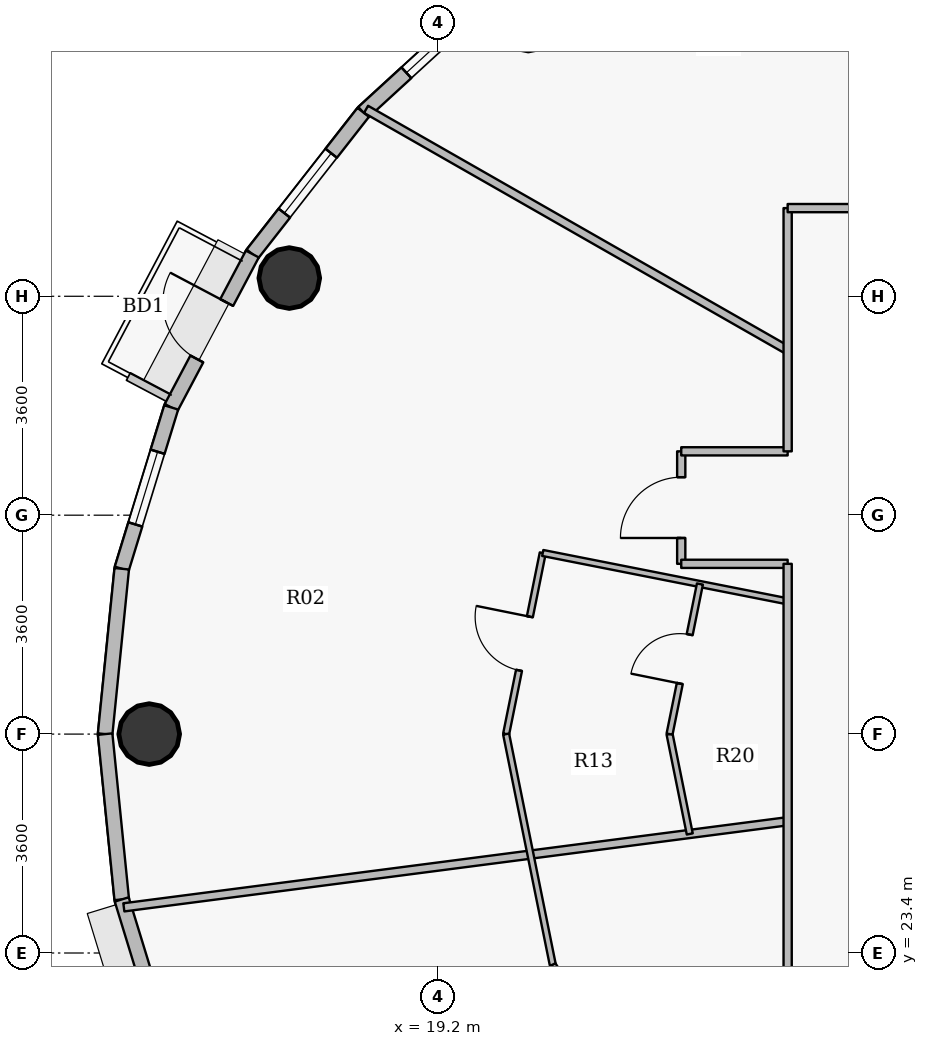
"""IFC4 building model, lengths in metres.
Left out: names, types, materials, properties, quantities, classifications, styles, units other than length and angle.
Written with IfcOpenShell. Run it as: python <this file> out.ifc"""

import sys

from ifc_helpers import new_model, si_unit, direction, frame, frame_2d, origin, origin_2d, place, context, subcontext, project, spatial, rectangle, hollow_circle, extrude, source, transform, mapped, element, fill, save


model = new_model("IFC4")
c1 = context("Model", 3, precision=1e-05, world=origin(), true_north=direction((0.0, 1.0)))
c2 = subcontext(c1, "Body", "Model", "MODEL_VIEW")
j1 = project(units=[si_unit("LENGTHUNIT", "METRE"), si_unit("PLANEANGLEUNIT", "RADIAN")], contexts=[c1])
p1 = place(None, origin())
s1 = spatial("IfcSite", under=j1, at=p1, CompositionType="ELEMENT")
p2 = place(p1, origin())
s2 = spatial("IfcBuilding", under=s1, at=p2, CompositionType="ELEMENT")
p3 = place(p2, frame((0.0, 0.0, 295.5)))
s3 = spatial("IfcBuildingStorey", under=s2, at=p3, CompositionType="ELEMENT", Elevation=295.5)
for number, where, z_axis, x_axis in (
    (1, (16.754, 34.5, 0.0), (0.0, 0.0, 1.0), (1.0, 0.0, 0.0)),
    (2, (14.45, 27.0, 0.0), (0.0, 0.0, 1.0), (1.0, 0.0, 0.0)),
):
    element("IfcColumn", number, at=place(p3, frame(where, z_axis=z_axis, x_axis=x_axis)), inside=s3, PredefinedType="COLUMN", context=c2, shape_type="SweptSolid", body=[
        extrude(hollow_circle(Radius=0.5, WallThickness=0.032, at=origin_2d()), origin(), (0.0, 0.0, 1.0), 3.75),
    ])
p4 = place(p3, frame((17.97, 37.225, 0.0), z_axis=(0.0, 0.0, 1.0), x_axis=(0.737068506972, 0.675818034703, 0.0)))
e3 = element("IfcWall", 3, at=p4, inside=s3, PredefinedType="SOLIDWALL", context=c2, shape_type="SweptSolid", body=[
    extrude(rectangle(XDim=3.077, YDim=0.24, at=frame_2d((1.539, 0.0))), origin(), (0.0, 0.0, 1.0), 3.5),
])
p5 = place(p4, frame((0.963, 0.0, 0.9)))
e4 = element("IfcOpeningElement", 4, at=p5, cuts=e3, PredefinedType="OPENING", context=c2, shape_type="SweptSolid", body=[
    extrude(rectangle(XDim=1.25, YDim=1.65, at=origin_2d()), frame((0.625, 0.13, 0.825), z_axis=(0.0, -1.0, 0.0), x_axis=(1.0, 0.0, 0.0)), (0.0, 0.0, 1.0), 0.26),
])
p6 = place(p3, frame((16.146, 34.895, 0.0), z_axis=(0.0, 0.0, 1.0), x_axis=(0.616337186556, 0.787482363275, 0.0)))
e5 = element("IfcWall", 5, at=p6, inside=s3, PredefinedType="SOLIDWALL", context=c2, shape_type="SweptSolid", body=[
    extrude(rectangle(XDim=2.958, YDim=0.24, at=frame_2d((1.479, 0.0))), origin(), (0.0, 0.0, 1.0), 3.5),
])
p7 = place(p6, frame((0.854, 0.0, 0.9)))
e6 = element("IfcOpeningElement", 6, at=p7, cuts=e5, PredefinedType="OPENING", context=c2, shape_type="SweptSolid", body=[
    extrude(rectangle(XDim=1.25, YDim=1.65, at=origin_2d()), frame((0.625, 0.13, 0.825), z_axis=(0.0, -1.0, 0.0), x_axis=(1.0, 0.0, 0.0)), (0.0, 0.0, 1.0), 0.26),
])
p8 = place(p3, frame((14.812, 32.372, 0.0), z_axis=(0.0, 0.0, 1.0), x_axis=(0.467628269026, 0.883925224218, 0.0)))
e7 = element("IfcWall", 7, at=p8, inside=s3, PredefinedType="SOLIDWALL", context=c2, shape_type="SweptSolid", body=[
    extrude(rectangle(XDim=2.854, YDim=0.24, at=frame_2d((1.427, 0.0))), origin(), (0.0, 0.0, 1.0), 3.5),
])
p9 = place(p8, frame((0.902, 0.0, 0.0)))
e8 = element("IfcOpeningElement", 8, at=p9, cuts=e7, PredefinedType="OPENING", context=c2, shape_type="SweptSolid", body=[
    extrude(rectangle(XDim=1.05, YDim=2.15, at=origin_2d()), frame((0.525, 0.13, 1.075), z_axis=(0.0, -1.0, 0.0), x_axis=(1.0, 0.0, 0.0)), (0.0, 0.0, 1.0), 0.26),
])
p10 = place(p3, frame((13.998, 29.719, 0.0), z_axis=(0.0, 0.0, 1.0), x_axis=(0.2931213403, 0.956075248012, 0.0)))
e9 = element("IfcWall", 9, at=p10, inside=s3, PredefinedType="SOLIDWALL", context=c2, shape_type="SweptSolid", body=[
    extrude(rectangle(XDim=2.775, YDim=0.24, at=frame_2d((1.388, 0.0))), origin(), (0.0, 0.0, 1.0), 3.5),
])
p11 = place(p10, frame((0.763, 0.0, 0.9)))
e10 = element("IfcOpeningElement", 10, at=p11, cuts=e9, PredefinedType="OPENING", context=c2, shape_type="SweptSolid", body=[
    extrude(rectangle(XDim=1.25, YDim=1.65, at=origin_2d()), frame((0.625, 0.13, 0.825), z_axis=(0.0, -1.0, 0.0), x_axis=(1.0, 0.0, 0.0)), (0.0, 0.0, 1.0), 0.26),
])
for number, where, z_axis, x_axis in (
    (11, (13.725, 27.0, 0.0), (0.0, 0.0, 1.0), (0.1, 0.995, 0.0)),
    (12, (13.998, 24.281, 0.0), (0.0, 0.0, 1.0), (-0.1, 0.995, 0.0)),
):
    element("IfcWall", number, at=place(p3, frame(where, z_axis=z_axis, x_axis=x_axis)), inside=s3, PredefinedType="SOLIDWALL", context=c2, shape_type="SweptSolid", body=[
        extrude(rectangle(XDim=2.733, YDim=0.24, at=frame_2d((1.366, 0.0))), origin(), (0.0, 0.0, 1.0), 3.5),
    ])
p12 = place(p3, frame((14.812, 21.628, 0.0), z_axis=(0.0, 0.0, 1.0), x_axis=(-0.2931213403, 0.956075248012, 0.0)))
e13 = element("IfcWall", 13, at=p12, inside=s3, PredefinedType="SOLIDWALL", context=c2, shape_type="SweptSolid", body=[
    extrude(rectangle(XDim=2.775, YDim=0.24, at=frame_2d((1.388, 0.0))), origin(), (0.0, 0.0, 1.0), 3.5),
])
p13 = place(p3, frame((14.033, 24.151, 0.0), z_axis=(0.0, 0.0, 1.0), x_axis=(0.99169266035, 0.128629963101, 0.0)))
e14 = element("IfcWall", 14, at=p13, inside=s3, PredefinedType="PARTITIONING", context=c2, shape_type="SweptSolid", body=[
    extrude(rectangle(XDim=11.009, YDim=0.135, at=frame_2d((5.504, 0.0))), origin(), (0.0, 0.0, 1.0), 2.985),
])
p14 = place(p3, frame((18.016, 37.274, 0.0), z_axis=(0.0, 0.0, 1.0), x_axis=(0.868277005727, -0.496079672357, 0.0)))
e15 = element("IfcWall", 15, at=p14, inside=s3, PredefinedType="PARTITIONING", context=c2, shape_type="SweptSolid", body=[
    extrude(rectangle(XDim=7.985, YDim=0.135, at=frame_2d((3.993, 0.0))), origin(), (0.0, 0.0, 1.0), 2.985),
])
p15 = place(p3, frame((20.32, 27.0, 0.0), z_axis=(0.0, 0.0, 1.0), x_axis=(0.198201469781, 0.980161301713, 0.0)))
e16 = element("IfcWall", 16, at=p15, inside=s3, PredefinedType="PARTITIONING", context=c2, shape_type="SweptSolid", body=[
    extrude(rectangle(XDim=3.039, YDim=0.1, at=frame_2d((1.52, 0.0))), origin(), (0.0, 0.0, 1.0), 3.035),
])
p16 = place(p15, frame((1.069, 0.0, 0.0)))
e17 = element("IfcOpeningElement", 17, at=p16, cuts=e16, PredefinedType="OPENING", context=c2, shape_type="SweptSolid", body=[
    extrude(rectangle(XDim=0.9, YDim=2.1, at=origin_2d()), frame((0.45, 0.06, 1.05), z_axis=(0.0, -1.0, 0.0), x_axis=(1.0, 0.0, 0.0)), (0.0, 0.0, 1.0), 0.12),
])
p17 = place(p3, frame((20.32, 27.0, 0.0), z_axis=(0.0, 0.0, 1.0), x_axis=(0.198226068862, -0.980156327135, 0.0)))
e18 = element("IfcWall", 18, at=p17, inside=s3, PredefinedType="PARTITIONING", context=c2, shape_type="SweptSolid", body=[
    extrude(rectangle(XDim=3.871, YDim=0.1, at=frame_2d((1.936, 0.0))), origin(), (0.0, 0.0, 1.0), 3.035),
])
p18 = place(p3, frame((20.922, 29.979, 0.0), z_axis=(0.0, 0.0, 1.0), x_axis=(0.981042206934, -0.19379419035, 0.0)))
e19 = element("IfcWall", 19, at=p18, inside=s3, PredefinedType="PARTITIONING", context=c2, shape_type="SweptSolid", body=[
    extrude(rectangle(XDim=4.106, YDim=0.1, at=frame_2d((2.053, 0.0))), origin(), (0.0, 0.0, 1.0), 3.5),
])
p19 = place(p3, frame((21.087, 23.206, 0.0), z_axis=(0.0, 0.0, 1.0), x_axis=(0.545435886628, -0.838152547916, 0.0)))
e20 = element("IfcWall", 20, at=p19, inside=s3, PredefinedType="PARTITIONING", context=c2, shape_type="SweptSolid", body=[
    extrude(rectangle(XDim=4.083, YDim=0.1, at=frame_2d((2.042, 0.0))), origin(), (0.0, 0.0, 1.0), 3.035),
])
p20 = place(p3, frame((23.008, 27.0, 0.0), z_axis=(0.0, 0.0, 1.0), x_axis=(0.198189512146, -0.980163719628, 0.0)))
e21 = element("IfcWall", 21, at=p20, inside=s3, PredefinedType="PARTITIONING", context=c2, shape_type="SweptSolid", body=[
    extrude(rectangle(XDim=1.675, YDim=0.1, at=frame_2d((0.838, 0.0))), origin(), (0.0, 0.0, 1.0), 3.035),
])
p21 = place(p3, frame((23.008, 27.0, 0.0), z_axis=(0.0, 0.0, 1.0), x_axis=(0.19818541272, 0.980164548525, 0.0)))
e22 = element("IfcWall", 22, at=p21, inside=s3, PredefinedType="PARTITIONING", context=c2, shape_type="SweptSolid", body=[
    extrude(rectangle(XDim=2.518, YDim=0.1, at=frame_2d((1.259, 0.0))), origin(), (0.0, 0.0, 1.0), 3.035),
])
p22 = place(p21, frame((0.849, 0.0, 0.0)))
e23 = element("IfcOpeningElement", 23, at=p22, cuts=e22, PredefinedType="OPENING", context=c2, shape_type="SweptSolid", body=[
    extrude(rectangle(XDim=0.82, YDim=2.1, at=origin_2d()), frame((0.41, 0.06, 1.05), z_axis=(0.0, -1.0, 0.0), x_axis=(1.0, 0.0, 0.0)), (0.0, 0.0, 1.0), 0.12),
])
p23 = place(p3, frame((23.2, 29.8, 0.0), z_axis=(0.0, 0.0, 1.0), x_axis=(0.0, 1.0, 0.0)))
e24 = element("IfcWall", 24, at=p23, inside=s3, PredefinedType="PARTITIONING", context=c2, shape_type="SweptSolid", body=[
    extrude(rectangle(XDim=1.85, YDim=0.135, at=frame_2d((0.925, 0.0))), origin(), (0.0, 0.0, 1.0), 3.5),
])
p24 = place(p23, frame((0.425, 0.0, 0.0)))
e25 = element("IfcOpeningElement", 25, at=p24, cuts=e24, PredefinedType="OPENING", context=c2, shape_type="SweptSolid", body=[
    extrude(rectangle(XDim=1.0, YDim=2.15, at=origin_2d()), frame((0.5, 0.078, 1.075), z_axis=(0.0, -1.0, 0.0), x_axis=(1.0, 0.0, 0.0)), (0.0, 0.0, 1.0), 0.155),
])
p25 = place(p3, frame((23.2, 29.8, 0.0), z_axis=(0.0, 0.0, 1.0), x_axis=(1.0, 0.0, 0.0)))
e26 = element("IfcWall", 26, at=p25, inside=s3, PredefinedType="PARTITIONING", context=c2, shape_type="SweptSolid", body=[
    extrude(rectangle(XDim=1.75, YDim=0.135, at=frame_2d((0.875, 0.0))), origin(), (0.0, 0.0, 1.0), 3.5),
])
p26 = place(p3, frame((23.2, 31.65, 0.0), z_axis=(0.0, 0.0, 1.0), x_axis=(1.0, 0.0, 0.0)))
e27 = element("IfcWall", 27, at=p26, inside=s3, PredefinedType="PARTITIONING", context=c2, shape_type="SweptSolid", body=[
    extrude(rectangle(XDim=1.75, YDim=0.135, at=frame_2d((0.875, 0.0))), origin(), (0.0, 0.0, 1.0), 3.035),
])
p27 = place(p3, frame((24.95, 18.35, 0.0), z_axis=(0.0, 0.0, 1.0), x_axis=(0.0, 1.0, 0.0)))
e28 = element("IfcWall", 28, at=p27, inside=s3, PredefinedType="PARTITIONING", context=c2, shape_type="SweptSolid", body=[
    extrude(rectangle(XDim=11.45, YDim=0.135, at=frame_2d((5.725, 0.0))), origin(), (0.0, 0.0, 1.0), 3.035),
])
p28 = place(p27, frame((3.128, 0.0, 0.0)))
e29 = element("IfcOpeningElement", 29, at=p28, cuts=e28, PredefinedType="OPENING", context=c2, shape_type="SweptSolid", body=[
    extrude(rectangle(XDim=1.0, YDim=2.15, at=origin_2d()), frame((0.5, 0.078, 1.075), z_axis=(0.0, -1.0, 0.0), x_axis=(1.0, 0.0, 0.0)), (0.0, 0.0, 1.0), 0.155),
])
p29 = place(p3, frame((24.95, 31.65, 0.0), z_axis=(0.0, 0.0, 1.0), x_axis=(0.0, 1.0, 0.0)))
e30 = element("IfcWall", 30, at=p29, inside=s3, PredefinedType="PARTITIONING", context=c2, shape_type="SweptSolid", body=[
    extrude(rectangle(XDim=4.0, YDim=0.135, at=frame_2d((2.0, 0.0))), origin(), (0.0, 0.0, 1.0), 3.035),
])
p30 = place(p3, frame((24.95, 35.65, 0.0), z_axis=(0.0, 0.0, 1.0), x_axis=(1.0, 0.0, 0.0)))
e31 = element("IfcWall", 31, at=p30, inside=s3, PredefinedType="PARTITIONING", context=c2, shape_type="SweptSolid", body=[
    extrude(rectangle(XDim=10.1, YDim=0.135, at=frame_2d((5.05, 0.0))), origin(), (0.0, 0.0, 1.0), 3.035),
])
p31 = place(p30, frame((1.192, 0.0, 0.0)))
e32 = element("IfcOpeningElement", 32, at=p31, cuts=e31, PredefinedType="OPENING", context=c2, shape_type="SweptSolid", body=[
    extrude(rectangle(XDim=1.0, YDim=2.15, at=origin_2d()), frame((0.5, 0.078, 1.075), z_axis=(0.0, -1.0, 0.0), x_axis=(1.0, 0.0, 0.0)), (0.0, 0.0, 1.0), 0.155),
])
m1 = source(origin(), c2, "Body", "SweptSolid", [
    extrude(rectangle(XDim=1.25, YDim=1.65, at=origin_2d()), frame((0.625, 0.03, 0.825), z_axis=(0.0, -1.0, 0.0), x_axis=(1.0, 0.0, 0.0)), (0.0, 0.0, 1.0), 0.06),
])
p32 = place(p5, origin())
e33 = element("IfcWindow", 33, at=p32, inside=s3, PartitioningType="SINGLE_PANEL", PredefinedType="WINDOW", context=c2, shape_type="MappedRepresentation", body=[
    mapped(m1, transform((0.0, 0.0, 0.0), x_axis=(1.0, 0.0, 0.0), y_axis=(0.0, 1.0, 0.0), z_axis=(0.0, 0.0, 1.0), scale=1.0)),
])
fill(e4, e33)
p33 = place(p7, origin())
e34 = element("IfcWindow", 34, at=p33, inside=s3, PartitioningType="SINGLE_PANEL", PredefinedType="WINDOW", context=c2, shape_type="MappedRepresentation", body=[
    mapped(m1, transform((0.0, 0.0, 0.0), x_axis=(1.0, 0.0, 0.0), y_axis=(0.0, 1.0, 0.0), z_axis=(0.0, 0.0, 1.0), scale=1.0)),
])
fill(e6, e34)
m2 = source(origin(), c2, "Body", "SweptSolid", [
    extrude(rectangle(XDim=1.05, YDim=2.15, at=origin_2d()), frame((0.525, 0.025, 1.075), z_axis=(0.0, -1.0, 0.0), x_axis=(1.0, 0.0, 0.0)), (0.0, 0.0, 1.0), 0.05),
])
p34 = place(p9, origin())
e35 = element("IfcDoor", 35, at=p34, inside=s3, OperationType="SINGLE_SWING_RIGHT", PredefinedType="DOOR", context=c2, shape_type="MappedRepresentation", body=[
    mapped(m2, transform((0.0, 0.0, 0.0), x_axis=(1.0, 0.0, 0.0), y_axis=(0.0, 1.0, 0.0), z_axis=(0.0, 0.0, 1.0), scale=1.0)),
])
fill(e8, e35)
p35 = place(p11, origin())
e36 = element("IfcWindow", 36, at=p35, inside=s3, PartitioningType="SINGLE_PANEL", PredefinedType="WINDOW", context=c2, shape_type="MappedRepresentation", body=[
    mapped(m1, transform((0.0, 0.0, 0.0), x_axis=(1.0, 0.0, 0.0), y_axis=(0.0, 1.0, 0.0), z_axis=(0.0, 0.0, 1.0), scale=1.0)),
])
fill(e10, e36)
m3 = source(origin(), c2, "Body", "SweptSolid", [
    extrude(rectangle(XDim=1.0, YDim=2.15, at=origin_2d()), frame((0.5, 0.025, 1.075), z_axis=(0.0, -1.0, 0.0), x_axis=(1.0, 0.0, 0.0)), (0.0, 0.0, 1.0), 0.05),
])
p36 = place(p24, origin())
e37 = element("IfcDoor", 37, at=p36, inside=s3, OperationType="SINGLE_SWING_LEFT", PredefinedType="DOOR", context=c2, shape_type="MappedRepresentation", body=[
    mapped(m3, transform((0.0, 0.0, 0.0), x_axis=(1.0, 0.0, 0.0), y_axis=(0.0, 1.0, 0.0), z_axis=(0.0, 0.0, 1.0), scale=1.0)),
])
fill(e25, e37)
m4 = source(origin(), c2, "Body", "SweptSolid", [
    extrude(rectangle(XDim=0.9, YDim=2.1, at=origin_2d()), frame((0.45, 0.025, 1.05), z_axis=(0.0, -1.0, 0.0), x_axis=(1.0, 0.0, 0.0)), (0.0, 0.0, 1.0), 0.05),
])
p37 = place(p16, origin())
e38 = element("IfcDoor", 38, at=p37, inside=s3, OperationType="SINGLE_SWING_RIGHT", PredefinedType="DOOR", context=c2, shape_type="MappedRepresentation", body=[
    mapped(m4, transform((0.0, 0.0, 0.0), x_axis=(1.0, 0.0, 0.0), y_axis=(0.0, 1.0, 0.0), z_axis=(0.0, 0.0, 1.0), scale=1.0)),
])
fill(e17, e38)
m5 = source(origin(), c2, "Body", "SweptSolid", [
    extrude(rectangle(XDim=0.82, YDim=2.1, at=origin_2d()), frame((0.41, 0.025, 1.05), z_axis=(0.0, -1.0, 0.0), x_axis=(1.0, 0.0, 0.0)), (0.0, 0.0, 1.0), 0.05),
])
p38 = place(p22, origin())
e39 = element("IfcDoor", 39, at=p38, inside=s3, OperationType="SINGLE_SWING_LEFT", PredefinedType="DOOR", context=c2, shape_type="MappedRepresentation", body=[
    mapped(m5, transform((0.0, 0.0, 0.0), x_axis=(1.0, 0.0, 0.0), y_axis=(0.0, 1.0, 0.0), z_axis=(0.0, 0.0, 1.0), scale=1.0)),
])
fill(e23, e39)
save(model, sys.argv[1])
